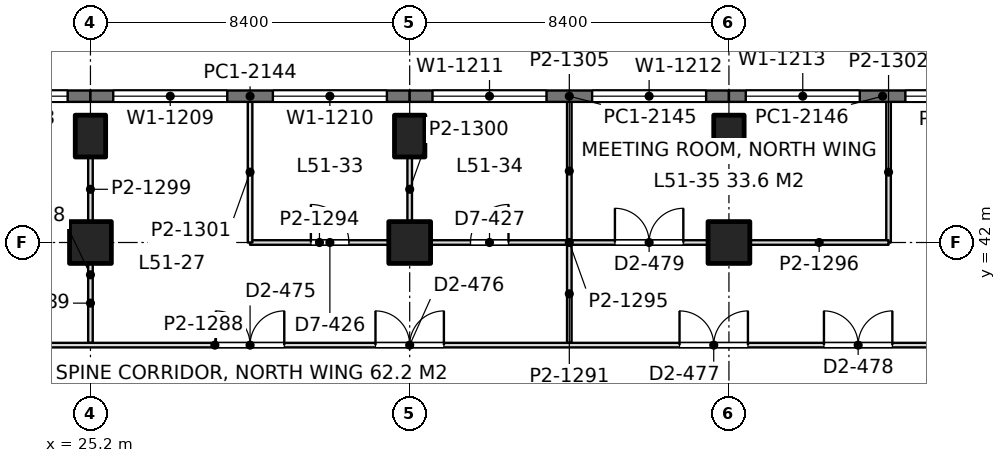
"""IFC4 building model, lengths in metres.
Left out: names, types, materials, properties, quantities, classifications, styles, units other than length and angle.
Written with IfcOpenShell. Run it as: python <this file> out.ifc"""

import sys

from ifc_helpers import new_model, si_unit, direction, frame, frame_2d, origin, origin_2d, place, context, subcontext, project, spatial, rectangle, extrude, element, fill, save


model = new_model("IFC4")
c1 = context("Model", 3, precision=1e-05, world=origin(), true_north=direction((0.0, 1.0)))
c2 = subcontext(c1, "Body", "Model", "MODEL_VIEW")
j1 = project(units=[si_unit("LENGTHUNIT", "METRE"), si_unit("PLANEANGLEUNIT", "RADIAN")], contexts=[c1])
p1 = place(None, origin())
s1 = spatial("IfcSite", under=j1, at=p1, CompositionType="ELEMENT")
p2 = place(p1, origin())
s2 = spatial("IfcBuilding", under=s1, at=p2, CompositionType="ELEMENT")
p3 = place(p2, frame((0.0, 0.0, 223.8)))
s3 = spatial("IfcBuildingStorey", under=s2, at=p3, CompositionType="ELEMENT", Elevation=223.8)
p4 = place(p3, frame((25.2, 42.0, 0.0), z_axis=(0.0, 0.0, 1.0), x_axis=(1.0, 0.0, 0.0)))
e1 = element("IfcColumn", 1, at=p4, inside=s3, PredefinedType="COLUMN", context=c2, shape_type="SweptSolid", body=[
    extrude(rectangle(XDim=1.1, YDim=1.1, at=origin_2d()), origin(), (0.0, 0.0, 1.0), 4.2),
])
p5 = place(p3, frame((25.2, 44.8, 0.0), z_axis=(0.0, 0.0, 1.0), x_axis=(1.0, 0.0, 0.0)))
e2 = element("IfcColumn", 2, at=p5, inside=s3, PredefinedType="COLUMN", context=c2, shape_type="SweptSolid", body=[
    extrude(rectangle(XDim=0.8, YDim=1.1, at=origin_2d()), origin(), (0.0, 0.0, 1.0), 4.2),
])
p6 = place(p3, frame((33.6, 42.0, 0.0), z_axis=(0.0, 0.0, 1.0), x_axis=(1.0, 0.0, 0.0)))
e3 = element("IfcColumn", 3, at=p6, inside=s3, PredefinedType="COLUMN", context=c2, shape_type="SweptSolid", body=[
    extrude(rectangle(XDim=1.1, YDim=1.1, at=origin_2d()), origin(), (0.0, 0.0, 1.0), 4.2),
])
p7 = place(p3, frame((33.6, 44.8, 0.0), z_axis=(0.0, 0.0, 1.0), x_axis=(1.0, 0.0, 0.0)))
e4 = element("IfcColumn", 4, at=p7, inside=s3, PredefinedType="COLUMN", context=c2, shape_type="SweptSolid", body=[
    extrude(rectangle(XDim=0.8, YDim=1.1, at=origin_2d()), origin(), (0.0, 0.0, 1.0), 4.2),
])
p8 = place(p3, frame((42.0, 42.0, 0.0), z_axis=(0.0, 0.0, 1.0), x_axis=(1.0, 0.0, 0.0)))
e5 = element("IfcColumn", 5, at=p8, inside=s3, PredefinedType="COLUMN", context=c2, shape_type="SweptSolid", body=[
    extrude(rectangle(XDim=1.1, YDim=1.1, at=origin_2d()), origin(), (0.0, 0.0, 1.0), 4.2),
])
p9 = place(p3, frame((42.0, 44.8, 0.0), z_axis=(0.0, 0.0, 1.0), x_axis=(1.0, 0.0, 0.0)))
e6 = element("IfcColumn", 6, at=p9, inside=s3, PredefinedType="COLUMN", context=c2, shape_type="SweptSolid", body=[
    extrude(rectangle(XDim=0.8, YDim=1.1, at=origin_2d()), origin(), (0.0, 0.0, 1.0), 4.2),
])
p10 = place(p3, frame((16.8, 45.85, 0.0), z_axis=(0.0, 0.0, 1.0), x_axis=(1.0, 0.0, 0.0)))
e7 = element("IfcWall", 7, at=p10, inside=s3, PredefinedType="SOLIDWALL", context=c2, shape_type="SweptSolid", body=[
    extrude(rectangle(XDim=8.4, YDim=0.3, at=frame_2d((4.2, 0.0))), origin(), (0.0, 0.0, 1.0), 4.05),
])
p11 = place(p10, frame((0.6, 0.0, 0.9)))
e8 = element("IfcOpeningElement", 8, at=p11, cuts=e7, PredefinedType="OPENING", context=c2, shape_type="SweptSolid", body=[
    extrude(rectangle(XDim=3.0, YDim=1.9, at=frame_2d((1.5, 0.95))), frame((0.0, 0.16, 0.0), z_axis=(0.0, -1.0, 0.0), x_axis=(1.0, 0.0, 0.0)), (0.0, 0.0, 1.0), 0.32),
])
p12 = place(p10, frame((4.8, 0.0, 0.9)))
e9 = element("IfcOpeningElement", 9, at=p12, cuts=e7, PredefinedType="OPENING", context=c2, shape_type="SweptSolid", body=[
    extrude(rectangle(XDim=3.0, YDim=1.9, at=frame_2d((1.5, 0.95))), frame((0.0, 0.16, 0.0), z_axis=(0.0, -1.0, 0.0), x_axis=(1.0, 0.0, 0.0)), (0.0, 0.0, 1.0), 0.32),
])
p13 = place(p3, frame((25.2, 45.85, 0.0), z_axis=(0.0, 0.0, 1.0), x_axis=(1.0, 0.0, 0.0)))
e10 = element("IfcWall", 10, at=p13, inside=s3, PredefinedType="SOLIDWALL", context=c2, shape_type="SweptSolid", body=[
    extrude(rectangle(XDim=8.4, YDim=0.3, at=frame_2d((4.2, 0.0))), origin(), (0.0, 0.0, 1.0), 4.05),
])
p14 = place(p13, frame((0.6, 0.0, 0.9)))
e11 = element("IfcOpeningElement", 11, at=p14, cuts=e10, PredefinedType="OPENING", context=c2, shape_type="SweptSolid", body=[
    extrude(rectangle(XDim=3.0, YDim=1.9, at=frame_2d((1.5, 0.95))), frame((0.0, 0.16, 0.0), z_axis=(0.0, -1.0, 0.0), x_axis=(1.0, 0.0, 0.0)), (0.0, 0.0, 1.0), 0.32),
])
p15 = place(p13, frame((4.8, 0.0, 0.9)))
e12 = element("IfcOpeningElement", 12, at=p15, cuts=e10, PredefinedType="OPENING", context=c2, shape_type="SweptSolid", body=[
    extrude(rectangle(XDim=3.0, YDim=1.9, at=frame_2d((1.5, 0.95))), frame((0.0, 0.16, 0.0), z_axis=(0.0, -1.0, 0.0), x_axis=(1.0, 0.0, 0.0)), (0.0, 0.0, 1.0), 0.32),
])
p16 = place(p3, frame((33.6, 45.85, 0.0), z_axis=(0.0, 0.0, 1.0), x_axis=(1.0, 0.0, 0.0)))
e13 = element("IfcWall", 13, at=p16, inside=s3, PredefinedType="SOLIDWALL", context=c2, shape_type="SweptSolid", body=[
    extrude(rectangle(XDim=8.4, YDim=0.3, at=frame_2d((4.2, 0.0))), origin(), (0.0, 0.0, 1.0), 4.05),
])
p17 = place(p16, frame((0.6, 0.0, 0.9)))
e14 = element("IfcOpeningElement", 14, at=p17, cuts=e13, PredefinedType="OPENING", context=c2, shape_type="SweptSolid", body=[
    extrude(rectangle(XDim=3.0, YDim=1.9, at=frame_2d((1.5, 0.95))), frame((0.0, 0.16, 0.0), z_axis=(0.0, -1.0, 0.0), x_axis=(1.0, 0.0, 0.0)), (0.0, 0.0, 1.0), 0.32),
])
p18 = place(p16, frame((4.8, 0.0, 0.9)))
e15 = element("IfcOpeningElement", 15, at=p18, cuts=e13, PredefinedType="OPENING", context=c2, shape_type="SweptSolid", body=[
    extrude(rectangle(XDim=3.0, YDim=1.9, at=frame_2d((1.5, 0.95))), frame((0.0, 0.16, 0.0), z_axis=(0.0, -1.0, 0.0), x_axis=(1.0, 0.0, 0.0)), (0.0, 0.0, 1.0), 0.32),
])
p19 = place(p3, frame((42.0, 45.85, 0.0), z_axis=(0.0, 0.0, 1.0), x_axis=(1.0, 0.0, 0.0)))
e16 = element("IfcWall", 16, at=p19, inside=s3, PredefinedType="SOLIDWALL", context=c2, shape_type="SweptSolid", body=[
    extrude(rectangle(XDim=8.085, YDim=0.3, at=frame_2d((4.042, 0.0))), origin(), (0.0, 0.0, 1.0), 4.05),
])
p20 = place(p19, frame((0.443, 0.0, 0.9)))
e17 = element("IfcOpeningElement", 17, at=p20, cuts=e16, PredefinedType="OPENING", context=c2, shape_type="SweptSolid", body=[
    extrude(rectangle(XDim=3.0, YDim=1.9, at=frame_2d((1.5, 0.95))), frame((0.0, 0.16, 0.0), z_axis=(0.0, -1.0, 0.0), x_axis=(1.0, 0.0, 0.0)), (0.0, 0.0, 1.0), 0.32),
])
p21 = place(p19, frame((4.643, 0.0, 0.9)))
e18 = element("IfcOpeningElement", 18, at=p21, cuts=e16, PredefinedType="OPENING", context=c2, shape_type="SweptSolid", body=[
    extrude(rectangle(XDim=3.0, YDim=1.9, at=frame_2d((1.5, 0.95))), frame((0.0, 0.16, 0.0), z_axis=(0.0, -1.0, 0.0), x_axis=(1.0, 0.0, 0.0)), (0.0, 0.0, 1.0), 0.32),
])
p22 = place(p3, frame((29.4, 42.0, 0.0), z_axis=(0.0, 0.0, 1.0), x_axis=(1.0, 0.0, 0.0)))
e19 = element("IfcWall", 19, at=p22, inside=s3, PredefinedType="PARTITIONING", context=c2, shape_type="SweptSolid", body=[
    extrude(rectangle(XDim=3.651, YDim=0.12, at=frame_2d((1.826, 0.0))), origin(), (0.0, 0.0, 1.0), 3.55),
])
p23 = place(p22, frame((1.6, 0.0, 0.0)))
e20 = element("IfcOpeningElement", 20, at=p23, cuts=e19, PredefinedType="OPENING", context=c2, shape_type="SweptSolid", body=[
    extrude(rectangle(XDim=1.0, YDim=2.4, at=frame_2d((0.5, 1.2))), frame((0.0, 0.07, 0.0), z_axis=(0.0, -1.0, 0.0), x_axis=(1.0, 0.0, 0.0)), (0.0, 0.0, 1.0), 0.14),
])
p24 = place(p3, frame((34.149, 42.0, 0.0), z_axis=(0.0, 0.0, 1.0), x_axis=(1.0, 0.0, 0.0)))
e21 = element("IfcWall", 21, at=p24, inside=s3, PredefinedType="PARTITIONING", context=c2, shape_type="SweptSolid", body=[
    extrude(rectangle(XDim=7.302, YDim=0.12, at=frame_2d((3.651, 0.0))), origin(), (0.0, 0.0, 1.0), 3.55),
])
p25 = place(p24, frame((1.051, 0.0, 0.0)))
e22 = element("IfcOpeningElement", 22, at=p25, cuts=e21, PredefinedType="OPENING", context=c2, shape_type="SweptSolid", body=[
    extrude(rectangle(XDim=1.0, YDim=2.4, at=frame_2d((0.5, 1.2))), frame((0.0, 0.07, 0.0), z_axis=(0.0, -1.0, 0.0), x_axis=(1.0, 0.0, 0.0)), (0.0, 0.0, 1.0), 0.14),
])
p26 = place(p24, frame((4.851, 0.0, 0.0)))
e23 = element("IfcOpeningElement", 23, at=p26, cuts=e21, PredefinedType="OPENING", context=c2, shape_type="SweptSolid", body=[
    extrude(rectangle(XDim=1.8, YDim=2.2, at=frame_2d((0.9, 1.1))), frame((0.0, 0.07, 0.0), z_axis=(0.0, -1.0, 0.0), x_axis=(1.0, 0.0, 0.0)), (0.0, 0.0, 1.0), 0.14),
])
p27 = place(p3, frame((42.549, 42.0, 0.0), z_axis=(0.0, 0.0, 1.0), x_axis=(1.0, 0.0, 0.0)))
e24 = element("IfcWall", 24, at=p27, inside=s3, PredefinedType="PARTITIONING", context=c2, shape_type="SweptSolid", body=[
    extrude(rectangle(XDim=3.651, YDim=0.12, at=frame_2d((1.825, 0.0))), origin(), (0.0, 0.0, 1.0), 3.55),
])
p28 = place(p3, frame((29.4, 42.0, 0.0), z_axis=(0.0, 0.0, 1.0), x_axis=(0.0, 1.0, 0.0)))
e25 = element("IfcWall", 25, at=p28, inside=s3, PredefinedType="PARTITIONING", context=c2, shape_type="SweptSolid", body=[
    extrude(rectangle(XDim=3.702, YDim=0.12, at=frame_2d((1.851, 0.0))), origin(), (0.0, 0.0, 1.0), 3.55),
])
p29 = place(p3, frame((33.6, 42.549, 0.0), z_axis=(0.0, 0.0, 1.0), x_axis=(0.0, 1.0, 0.0)))
e26 = element("IfcWall", 26, at=p29, inside=s3, PredefinedType="PARTITIONING", context=c2, shape_type="SweptSolid", body=[
    extrude(rectangle(XDim=1.702, YDim=0.12, at=frame_2d((0.851, 0.0))), origin(), (0.0, 0.0, 1.0), 3.69),
])
p30 = place(p3, frame((37.8, 42.058, 0.0), z_axis=(0.0, 0.0, 1.0), x_axis=(0.0, 1.0, 0.0)))
e27 = element("IfcWall", 27, at=p30, inside=s3, PredefinedType="PARTITIONING", context=c2, shape_type="SweptSolid", body=[
    extrude(rectangle(XDim=3.644, YDim=0.12, at=frame_2d((1.822, 0.0))), origin(), (0.0, 0.0, 1.0), 3.55),
])
p31 = place(p3, frame((46.2, 42.0, 0.0), z_axis=(0.0, 0.0, 1.0), x_axis=(0.0, 1.0, 0.0)))
e28 = element("IfcWall", 28, at=p31, inside=s3, PredefinedType="PARTITIONING", context=c2, shape_type="SweptSolid", body=[
    extrude(rectangle(XDim=3.702, YDim=0.12, at=frame_2d((1.851, 0.0))), origin(), (0.0, 0.0, 1.0), 3.55),
])
p32 = place(p3, frame((25.2, 39.358, 0.0), z_axis=(0.0, 0.0, 1.0), x_axis=(0.0, 1.0, 0.0)))
e29 = element("IfcWall", 29, at=p32, inside=s3, PredefinedType="PARTITIONING", context=c2, shape_type="SweptSolid", body=[
    extrude(rectangle(XDim=2.093, YDim=0.12, at=frame_2d((1.046, 0.0))), origin(), (0.0, 0.0, 1.0), 3.55),
])
p33 = place(p3, frame((25.2, 42.549, 0.0), z_axis=(0.0, 0.0, 1.0), x_axis=(0.0, 1.0, 0.0)))
e30 = element("IfcWall", 30, at=p33, inside=s3, PredefinedType="PARTITIONING", context=c2, shape_type="SweptSolid", body=[
    extrude(rectangle(XDim=1.702, YDim=0.12, at=frame_2d((0.851, 0.0))), origin(), (0.0, 0.0, 1.0), 3.69),
])
p34 = place(p3, frame((37.8, 39.358, 0.0), z_axis=(0.0, 0.0, 1.0), x_axis=(0.0, 1.0, 0.0)))
e31 = element("IfcWall", 31, at=p34, inside=s3, PredefinedType="PARTITIONING", context=c2, shape_type="SweptSolid", body=[
    extrude(rectangle(XDim=2.584, YDim=0.12, at=frame_2d((1.292, 0.0))), origin(), (0.0, 0.0, 1.0), 3.55),
])
p35 = place(p3, frame((7.748, 39.3, 0.0), z_axis=(0.0, 0.0, 1.0), x_axis=(1.0, 0.0, 0.0)))
e32 = element("IfcWall", 32, at=p35, inside=s3, PredefinedType="PARTITIONING", context=c2, shape_type="SweptSolid", body=[
    extrude(rectangle(XDim=41.452, YDim=0.12, at=frame_2d((20.726, 0.0))), origin(), (0.0, 0.0, 1.0), 3.55),
])
p36 = place(p35, frame((1.527, 0.0, 0.0)))
e33 = element("IfcOpeningElement", 33, at=p36, cuts=e32, PredefinedType="OPENING", context=c2, shape_type="SweptSolid", body=[
    extrude(rectangle(XDim=1.8, YDim=2.2, at=frame_2d((0.9, 1.1))), frame((0.0, 0.07, 0.0), z_axis=(0.0, -1.0, 0.0), x_axis=(1.0, 0.0, 0.0)), (0.0, 0.0, 1.0), 0.14),
])
p37 = place(p35, frame((8.152, 0.0, 0.0)))
e34 = element("IfcOpeningElement", 34, at=p37, cuts=e32, PredefinedType="OPENING", context=c2, shape_type="SweptSolid", body=[
    extrude(rectangle(XDim=1.8, YDim=2.2, at=frame_2d((0.9, 1.1))), frame((0.0, 0.07, 0.0), z_axis=(0.0, -1.0, 0.0), x_axis=(1.0, 0.0, 0.0)), (0.0, 0.0, 1.0), 0.14),
])
p38 = place(p35, frame((12.352, 0.0, 0.0)))
e35 = element("IfcOpeningElement", 35, at=p38, cuts=e32, PredefinedType="OPENING", context=c2, shape_type="SweptSolid", body=[
    extrude(rectangle(XDim=1.8, YDim=2.2, at=frame_2d((0.9, 1.1))), frame((0.0, 0.07, 0.0), z_axis=(0.0, -1.0, 0.0), x_axis=(1.0, 0.0, 0.0)), (0.0, 0.0, 1.0), 0.14),
])
p39 = place(p35, frame((20.752, 0.0, 0.0)))
e36 = element("IfcOpeningElement", 36, at=p39, cuts=e32, PredefinedType="OPENING", context=c2, shape_type="SweptSolid", body=[
    extrude(rectangle(XDim=1.8, YDim=2.2, at=frame_2d((0.9, 1.1))), frame((0.0, 0.07, 0.0), z_axis=(0.0, -1.0, 0.0), x_axis=(1.0, 0.0, 0.0)), (0.0, 0.0, 1.0), 0.14),
])
p40 = place(p35, frame((24.952, 0.0, 0.0)))
e37 = element("IfcOpeningElement", 37, at=p40, cuts=e32, PredefinedType="OPENING", context=c2, shape_type="SweptSolid", body=[
    extrude(rectangle(XDim=1.8, YDim=2.2, at=frame_2d((0.9, 1.1))), frame((0.0, 0.07, 0.0), z_axis=(0.0, -1.0, 0.0), x_axis=(1.0, 0.0, 0.0)), (0.0, 0.0, 1.0), 0.14),
])
p41 = place(p35, frame((32.952, 0.0, 0.0)))
e38 = element("IfcOpeningElement", 38, at=p41, cuts=e32, PredefinedType="OPENING", context=c2, shape_type="SweptSolid", body=[
    extrude(rectangle(XDim=1.8, YDim=2.2, at=frame_2d((0.9, 1.1))), frame((0.0, 0.07, 0.0), z_axis=(0.0, -1.0, 0.0), x_axis=(1.0, 0.0, 0.0)), (0.0, 0.0, 1.0), 0.14),
])
p42 = place(p35, frame((36.752, 0.0, 0.0)))
e39 = element("IfcOpeningElement", 39, at=p42, cuts=e32, PredefinedType="OPENING", context=c2, shape_type="SweptSolid", body=[
    extrude(rectangle(XDim=1.8, YDim=2.2, at=frame_2d((0.9, 1.1))), frame((0.0, 0.07, 0.0), z_axis=(0.0, -1.0, 0.0), x_axis=(1.0, 0.0, 0.0)), (0.0, 0.0, 1.0), 0.14),
])
p43 = place(p12, origin())
e40 = element("IfcWindow", 40, at=p43, inside=s3, PartitioningType="SINGLE_PANEL", PredefinedType="WINDOW", context=c2, shape_type="SweptSolid", body=[
    extrude(rectangle(XDim=3.0, YDim=1.9, at=frame_2d((1.5, 0.95))), frame((0.0, 0.03, 0.0), z_axis=(0.0, -1.0, 0.0), x_axis=(1.0, 0.0, 0.0)), (0.0, 0.0, 1.0), 0.06),
])
fill(e9, e40)
p44 = place(p14, origin())
e41 = element("IfcWindow", 41, at=p44, inside=s3, PartitioningType="SINGLE_PANEL", PredefinedType="WINDOW", context=c2, shape_type="SweptSolid", body=[
    extrude(rectangle(XDim=3.0, YDim=1.9, at=frame_2d((1.5, 0.95))), frame((0.0, 0.03, 0.0), z_axis=(0.0, -1.0, 0.0), x_axis=(1.0, 0.0, 0.0)), (0.0, 0.0, 1.0), 0.06),
])
fill(e11, e41)
p45 = place(p15, origin())
e42 = element("IfcWindow", 42, at=p45, inside=s3, PartitioningType="SINGLE_PANEL", PredefinedType="WINDOW", context=c2, shape_type="SweptSolid", body=[
    extrude(rectangle(XDim=3.0, YDim=1.9, at=frame_2d((1.5, 0.95))), frame((0.0, 0.03, 0.0), z_axis=(0.0, -1.0, 0.0), x_axis=(1.0, 0.0, 0.0)), (0.0, 0.0, 1.0), 0.06),
])
fill(e12, e42)
p46 = place(p17, origin())
e43 = element("IfcWindow", 43, at=p46, inside=s3, PartitioningType="SINGLE_PANEL", PredefinedType="WINDOW", context=c2, shape_type="SweptSolid", body=[
    extrude(rectangle(XDim=3.0, YDim=1.9, at=frame_2d((1.5, 0.95))), frame((0.0, 0.03, 0.0), z_axis=(0.0, -1.0, 0.0), x_axis=(1.0, 0.0, 0.0)), (0.0, 0.0, 1.0), 0.06),
])
fill(e14, e43)
p47 = place(p18, origin())
e44 = element("IfcWindow", 44, at=p47, inside=s3, PartitioningType="SINGLE_PANEL", PredefinedType="WINDOW", context=c2, shape_type="SweptSolid", body=[
    extrude(rectangle(XDim=3.0, YDim=1.9, at=frame_2d((1.5, 0.95))), frame((0.0, 0.03, 0.0), z_axis=(0.0, -1.0, 0.0), x_axis=(1.0, 0.0, 0.0)), (0.0, 0.0, 1.0), 0.06),
])
fill(e15, e44)
p48 = place(p20, origin())
e45 = element("IfcWindow", 45, at=p48, inside=s3, PartitioningType="SINGLE_PANEL", PredefinedType="WINDOW", context=c2, shape_type="SweptSolid", body=[
    extrude(rectangle(XDim=3.0, YDim=1.9, at=frame_2d((1.5, 0.95))), frame((0.0, 0.03, 0.0), z_axis=(0.0, -1.0, 0.0), x_axis=(1.0, 0.0, 0.0)), (0.0, 0.0, 1.0), 0.06),
])
fill(e17, e45)
p49 = place(p21, origin())
e46 = element("IfcWindow", 46, at=p49, inside=s3, PartitioningType="SINGLE_PANEL", PredefinedType="WINDOW", context=c2, shape_type="SweptSolid", body=[
    extrude(rectangle(XDim=3.0, YDim=1.9, at=frame_2d((1.5, 0.95))), frame((0.0, 0.03, 0.0), z_axis=(0.0, -1.0, 0.0), x_axis=(1.0, 0.0, 0.0)), (0.0, 0.0, 1.0), 0.06),
])
fill(e18, e46)
p50 = place(p23, origin())
e47 = element("IfcDoor", 47, at=p50, inside=s3, OperationType="SINGLE_SWING_LEFT", PredefinedType="DOOR", context=c2, shape_type="SweptSolid", body=[
    extrude(rectangle(XDim=1.0, YDim=2.4, at=frame_2d((0.5, 1.2))), frame((0.0, 0.025, 0.0), z_axis=(0.0, -1.0, 0.0), x_axis=(1.0, 0.0, 0.0)), (0.0, 0.0, 1.0), 0.05),
])
fill(e20, e47)
p51 = place(p25, origin())
e48 = element("IfcDoor", 48, at=p51, inside=s3, OperationType="SINGLE_SWING_RIGHT", PredefinedType="DOOR", context=c2, shape_type="SweptSolid", body=[
    extrude(rectangle(XDim=1.0, YDim=2.4, at=frame_2d((0.5, 1.2))), frame((0.0, 0.025, 0.0), z_axis=(0.0, -1.0, 0.0), x_axis=(1.0, 0.0, 0.0)), (0.0, 0.0, 1.0), 0.05),
])
fill(e22, e48)
p52 = place(p26, origin())
e49 = element("IfcDoor", 49, at=p52, inside=s3, OperationType="DOUBLE_DOOR_SINGLE_SWING", PredefinedType="DOOR", context=c2, shape_type="SweptSolid", body=[
    extrude(rectangle(XDim=1.8, YDim=2.2, at=frame_2d((0.9, 1.1))), frame((0.0, 0.025, 0.0), z_axis=(0.0, -1.0, 0.0), x_axis=(1.0, 0.0, 0.0)), (0.0, 0.0, 1.0), 0.05),
])
fill(e23, e49)
p53 = place(p39, origin())
e50 = element("IfcDoor", 50, at=p53, inside=s3, OperationType="DOUBLE_DOOR_SINGLE_SWING", PredefinedType="DOOR", context=c2, shape_type="SweptSolid", body=[
    extrude(rectangle(XDim=1.8, YDim=2.2, at=frame_2d((0.9, 1.1))), frame((0.0, 0.025, 0.0), z_axis=(0.0, -1.0, 0.0), x_axis=(1.0, 0.0, 0.0)), (0.0, 0.0, 1.0), 0.05),
])
fill(e36, e50)
p54 = place(p40, origin())
e51 = element("IfcDoor", 51, at=p54, inside=s3, OperationType="DOUBLE_DOOR_SINGLE_SWING", PredefinedType="DOOR", context=c2, shape_type="SweptSolid", body=[
    extrude(rectangle(XDim=1.8, YDim=2.2, at=frame_2d((0.9, 1.1))), frame((0.0, 0.025, 0.0), z_axis=(0.0, -1.0, 0.0), x_axis=(1.0, 0.0, 0.0)), (0.0, 0.0, 1.0), 0.05),
])
fill(e37, e51)
p55 = place(p41, origin())
e52 = element("IfcDoor", 52, at=p55, inside=s3, OperationType="DOUBLE_DOOR_SINGLE_SWING", PredefinedType="DOOR", context=c2, shape_type="SweptSolid", body=[
    extrude(rectangle(XDim=1.8, YDim=2.2, at=frame_2d((0.9, 1.1))), frame((0.0, 0.025, 0.0), z_axis=(0.0, -1.0, 0.0), x_axis=(1.0, 0.0, 0.0)), (0.0, 0.0, 1.0), 0.05),
])
fill(e38, e52)
p56 = place(p42, origin())
e53 = element("IfcDoor", 53, at=p56, inside=s3, OperationType="DOUBLE_DOOR_SINGLE_SWING", PredefinedType="DOOR", context=c2, shape_type="SweptSolid", body=[
    extrude(rectangle(XDim=1.8, YDim=2.2, at=frame_2d((0.9, 1.1))), frame((0.0, 0.025, 0.0), z_axis=(0.0, -1.0, 0.0), x_axis=(1.0, 0.0, 0.0)), (0.0, 0.0, 1.0), 0.05),
])
fill(e39, e53)
save(model, sys.argv[1])
